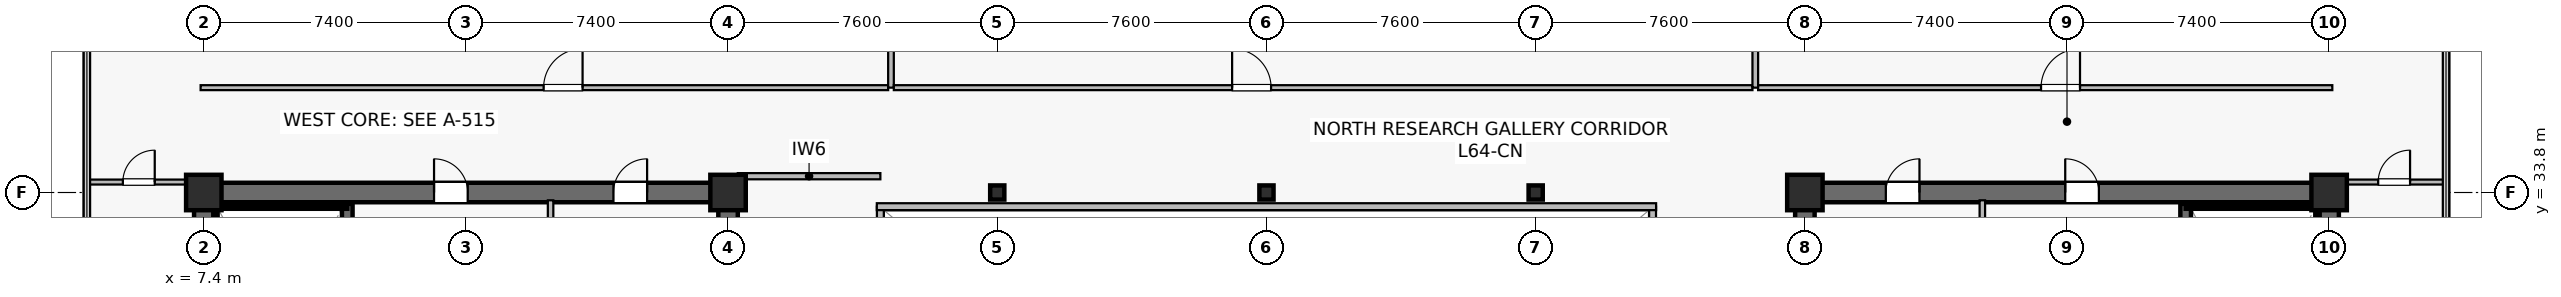
"""IFC4 building model, lengths in metres.
Left out: names, types, materials, properties, quantities, classifications, styles, units other than length and angle.
Written with IfcOpenShell. Run it as: python <this file> out.ifc"""

import sys

from ifc_helpers import new_model, si_unit, direction, frame, frame_2d, origin, origin_2d, place, context, subcontext, project, spatial, rectangle, hollow_rectangle, extrude, source, transform, mapped, element, fill, save


model = new_model("IFC4")
c1 = context("Model", 3, precision=1e-05, world=origin(), true_north=direction((0.0, 1.0)))
c2 = subcontext(c1, "Body", "Model", "MODEL_VIEW")
j1 = project(units=[si_unit("LENGTHUNIT", "METRE"), si_unit("PLANEANGLEUNIT", "RADIAN")], contexts=[c1])
p1 = place(None, origin())
s1 = spatial("IfcSite", under=j1, at=p1, CompositionType="ELEMENT")
p2 = place(p1, origin())
s2 = spatial("IfcBuilding", under=s1, at=p2, CompositionType="ELEMENT")
p3 = place(p2, frame((0.0, 0.0, 267.0)))
s3 = spatial("IfcBuildingStorey", under=s2, at=p3, CompositionType="ELEMENT", Elevation=267.0)
p4 = place(p3, frame((7.125, 33.8, 0.0), z_axis=(0.0, 0.0, 1.0), x_axis=(1.0, 0.0, 0.0)))
e1 = element("IfcWall", 1, at=p4, inside=s3, PredefinedType="SHEAR", context=c2, shape_type="SweptSolid", body=[
    extrude(rectangle(XDim=15.35, YDim=0.55, at=frame_2d((7.675, 0.0))), origin(), (0.0, 0.0, 1.0), 3.8),
])
p5 = place(p4, frame((6.775, 0.0, 0.0)))
e2 = element("IfcOpeningElement", 2, at=p5, cuts=e1, PredefinedType="OPENING", context=c2, shape_type="SweptSolid", body=[
    extrude(rectangle(XDim=0.95, YDim=2.15, at=frame_2d((0.475, 1.075))), frame((0.0, 0.285, 0.0), z_axis=(0.0, -1.0, 0.0), x_axis=(1.0, 0.0, 0.0)), (0.0, 0.0, 1.0), 0.57),
])
p6 = place(p4, frame((11.84, 0.0, 0.0)))
e3 = element("IfcOpeningElement", 3, at=p6, cuts=e1, PredefinedType="OPENING", context=c2, shape_type="SweptSolid", body=[
    extrude(rectangle(XDim=0.95, YDim=2.15, at=frame_2d((0.475, 1.075))), frame((0.0, 0.285, 0.0), z_axis=(0.0, -1.0, 0.0), x_axis=(1.0, 0.0, 0.0)), (0.0, 0.0, 1.0), 0.57),
])
p7 = place(p3, frame((7.4, 15.075, 0.0), z_axis=(0.0, 0.0, 1.0), x_axis=(0.0, 1.0, 0.0)))
e4 = element("IfcWall", 4, at=p7, inside=s3, PredefinedType="SHEAR", context=c2, shape_type="SweptSolid", body=[
    extrude(rectangle(XDim=18.45, YDim=0.55, at=frame_2d((9.225, 0.0))), origin(), (0.0, 0.0, 1.0), 3.8),
])
p8 = place(p3, frame((22.2, 15.075, 0.0), z_axis=(0.0, 0.0, 1.0), x_axis=(0.0, 1.0, 0.0)))
e5 = element("IfcWall", 5, at=p8, inside=s3, PredefinedType="SHEAR", context=c2, shape_type="SweptSolid", body=[
    extrude(rectangle(XDim=18.45, YDim=0.55, at=frame_2d((9.225, 0.0))), origin(), (0.0, 0.0, 1.0), 3.8),
])
p9 = place(p8, frame((3.475, 0.0, 0.0)))
e6 = element("IfcOpeningElement", 6, at=p9, cuts=e5, PredefinedType="OPENING", context=c2, shape_type="SweptSolid", body=[
    extrude(rectangle(XDim=1.42, YDim=2.2, at=frame_2d((0.71, 1.1))), frame((0.0, 0.285, 0.0), z_axis=(0.0, -1.0, 0.0), x_axis=(1.0, 0.0, 0.0)), (0.0, 0.0, 1.0), 0.57),
])
p10 = place(p3, frame((11.45, 24.85, 0.0), z_axis=(0.0, 0.0, 1.0), x_axis=(0.0, 1.0, 0.0)))
e7 = element("IfcWall", 7, at=p10, inside=s3, PredefinedType="SHEAR", context=c2, shape_type="SweptSolid", body=[
    extrude(rectangle(XDim=8.63, YDim=0.3, at=frame_2d((4.315, 0.0))), origin(), (0.0, 0.0, 1.0), 3.8),
])
p11 = place(p10, frame((0.42, 0.0, 0.0)))
e8 = element("IfcOpeningElement", 8, at=p11, cuts=e7, PredefinedType="OPENING", context=c2, shape_type="SweptSolid", body=[
    extrude(rectangle(XDim=1.1, YDim=2.15, at=frame_2d((0.55, 1.075))), frame((0.0, 0.16, 0.0), z_axis=(0.0, -1.0, 0.0), x_axis=(1.0, 0.0, 0.0)), (0.0, 0.0, 1.0), 0.32),
])
p12 = place(p3, frame((7.73, 33.4, 0.0), z_axis=(0.0, 0.0, 1.0), x_axis=(1.0, 0.0, 0.0)))
e9 = element("IfcWall", 9, at=p12, inside=s3, PredefinedType="SOLIDWALL", context=c2, shape_type="SweptSolid", body=[
    extrude(rectangle(XDim=3.72, YDim=0.12, at=frame_2d((1.86, 0.0))), origin(), (0.0, 0.0, 1.0), 3.8),
])
p13 = place(p3, frame((7.73, 25.0, 0.0), z_axis=(0.0, 0.0, 1.0), x_axis=(0.0, 1.0, 0.0)))
e10 = element("IfcWall", 10, at=p13, inside=s3, PredefinedType="SOLIDWALL", context=c2, shape_type="SweptSolid", body=[
    extrude(rectangle(XDim=8.32, YDim=0.12, at=frame_2d((4.16, 0.0))), origin(), (0.0, 0.0, 1.0), 3.8),
])
p14 = place(p3, frame((52.325, 33.8, 0.0), z_axis=(0.0, 0.0, 1.0), x_axis=(1.0, 0.0, 0.0)))
e11 = element("IfcWall", 11, at=p14, inside=s3, PredefinedType="SHEAR", context=c2, shape_type="SweptSolid", body=[
    extrude(rectangle(XDim=15.35, YDim=0.55, at=frame_2d((7.675, 0.0))), origin(), (0.0, 0.0, 1.0), 3.8),
])
p15 = place(p14, frame((7.625, 0.0, 0.0)))
e12 = element("IfcOpeningElement", 12, at=p15, cuts=e11, PredefinedType="OPENING", context=c2, shape_type="SweptSolid", body=[
    extrude(rectangle(XDim=0.95, YDim=2.15, at=frame_2d((0.475, 1.075))), frame((0.0, 0.285, 0.0), z_axis=(0.0, -1.0, 0.0), x_axis=(1.0, 0.0, 0.0)), (0.0, 0.0, 1.0), 0.57),
])
p16 = place(p14, frame((2.56, 0.0, 0.0)))
e13 = element("IfcOpeningElement", 13, at=p16, cuts=e11, PredefinedType="OPENING", context=c2, shape_type="SweptSolid", body=[
    extrude(rectangle(XDim=0.95, YDim=2.15, at=frame_2d((0.475, 1.075))), frame((0.0, 0.285, 0.0), z_axis=(0.0, -1.0, 0.0), x_axis=(1.0, 0.0, 0.0)), (0.0, 0.0, 1.0), 0.57),
])
p17 = place(p3, frame((52.6, 15.075, 0.0), z_axis=(0.0, 0.0, 1.0), x_axis=(0.0, 1.0, 0.0)))
e14 = element("IfcWall", 14, at=p17, inside=s3, PredefinedType="SHEAR", context=c2, shape_type="SweptSolid", body=[
    extrude(rectangle(XDim=18.45, YDim=0.55, at=frame_2d((9.225, 0.0))), origin(), (0.0, 0.0, 1.0), 3.8),
])
p18 = place(p17, frame((3.475, 0.0, 0.0)))
e15 = element("IfcOpeningElement", 15, at=p18, cuts=e14, PredefinedType="OPENING", context=c2, shape_type="SweptSolid", body=[
    extrude(rectangle(XDim=1.42, YDim=2.2, at=frame_2d((0.71, 1.1))), frame((0.0, 0.285, 0.0), z_axis=(0.0, -1.0, 0.0), x_axis=(1.0, 0.0, 0.0)), (0.0, 0.0, 1.0), 0.57),
])
p19 = place(p3, frame((67.4, 15.075, 0.0), z_axis=(0.0, 0.0, 1.0), x_axis=(0.0, 1.0, 0.0)))
e16 = element("IfcWall", 16, at=p19, inside=s3, PredefinedType="SHEAR", context=c2, shape_type="SweptSolid", body=[
    extrude(rectangle(XDim=18.45, YDim=0.55, at=frame_2d((9.225, 0.0))), origin(), (0.0, 0.0, 1.0), 3.8),
])
p20 = place(p3, frame((63.35, 24.85, 0.0), z_axis=(0.0, 0.0, 1.0), x_axis=(0.0, 1.0, 0.0)))
e17 = element("IfcWall", 17, at=p20, inside=s3, PredefinedType="SHEAR", context=c2, shape_type="SweptSolid", body=[
    extrude(rectangle(XDim=8.63, YDim=0.3, at=frame_2d((4.315, 0.0))), origin(), (0.0, 0.0, 1.0), 3.8),
])
p21 = place(p20, frame((0.42, 0.0, 0.0)))
e18 = element("IfcOpeningElement", 18, at=p21, cuts=e17, PredefinedType="OPENING", context=c2, shape_type="SweptSolid", body=[
    extrude(rectangle(XDim=1.1, YDim=2.15, at=frame_2d((0.55, 1.075))), frame((0.0, 0.16, 0.0), z_axis=(0.0, -1.0, 0.0), x_axis=(1.0, 0.0, 0.0)), (0.0, 0.0, 1.0), 0.32),
])
p22 = place(p3, frame((63.35, 33.4, 0.0), z_axis=(0.0, 0.0, 1.0), x_axis=(1.0, 0.0, 0.0)))
e19 = element("IfcWall", 19, at=p22, inside=s3, PredefinedType="SOLIDWALL", context=c2, shape_type="SweptSolid", body=[
    extrude(rectangle(XDim=3.72, YDim=0.12, at=frame_2d((1.86, 0.0))), origin(), (0.0, 0.0, 1.0), 3.8),
])
p23 = place(p3, frame((67.07, 25.0, 0.0), z_axis=(0.0, 0.0, 1.0), x_axis=(0.0, 1.0, 0.0)))
e20 = element("IfcWall", 20, at=p23, inside=s3, PredefinedType="SOLIDWALL", context=c2, shape_type="SweptSolid", body=[
    extrude(rectangle(XDim=8.32, YDim=0.12, at=frame_2d((4.16, 0.0))), origin(), (0.0, 0.0, 1.0), 3.8),
])
m1 = source(origin(), c2, "Body", "SweptSolid", [
    extrude(rectangle(XDim=1.0, YDim=1.0, at=origin_2d()), origin(), (0.0, 0.0, 1.0), 4.1),
])
for number, where, z_axis, x_axis in (
    (21, (7.4, 33.8, 0.0), (0.0, 0.0, 1.0), (1.0, 0.0, 0.0)),
    (22, (22.2, 33.8, 0.0), (0.0, 0.0, 1.0), (1.0, 0.0, 0.0)),
    (23, (52.6, 33.8, 0.0), (0.0, 0.0, 1.0), (1.0, 0.0, 0.0)),
    (24, (67.4, 33.8, 0.0), (0.0, 0.0, 1.0), (1.0, 0.0, 0.0)),
):
    element("IfcColumn", number, at=place(p3, frame(where, z_axis=z_axis, x_axis=x_axis)), inside=s3, PredefinedType="COLUMN", context=c2, shape_type="MappedRepresentation", body=[
        mapped(m1, transform((0.0, 0.0, 0.0), scale=1.0)),
    ])
m2 = source(origin(), c2, "Body", "SweptSolid", [
    extrude(hollow_rectangle(XDim=0.4, YDim=0.4, WallThickness=0.019, at=origin_2d()), origin(), (0.0, 0.0, 1.0), 4.1),
])
for number, where, z_axis, x_axis in (
    (25, (29.8, 33.8, 0.0), (0.0, 0.0, 1.0), (1.0, 0.0, 0.0)),
    (26, (37.4, 33.8, 0.0), (0.0, 0.0, 1.0), (1.0, 0.0, 0.0)),
    (27, (45.0, 33.8, 0.0), (0.0, 0.0, 1.0), (1.0, 0.0, 0.0)),
):
    element("IfcColumn", number, at=place(p3, frame(where, z_axis=z_axis, x_axis=x_axis)), inside=s3, PredefinedType="COLUMN", context=c2, shape_type="MappedRepresentation", body=[
        mapped(m2, transform((0.0, 0.0, 0.0), scale=1.0)),
    ])
for number, where, z_axis, x_axis in (
    (28, (17.19, 29.65, 0.0), (0.0, 0.0, 1.0), (0.0, 1.0, 0.0)),
    (29, (57.61, 29.65, 0.0), (0.0, 0.0, 1.0), (0.0, 1.0, 0.0)),
):
    element("IfcWall", number, at=place(p3, frame(where, z_axis=z_axis, x_axis=x_axis)), inside=s3, PredefinedType="PLUMBINGWALL", context=c2, shape_type="SweptSolid", body=[
        extrude(rectangle(XDim=3.93, YDim=0.155, at=frame_2d((1.965, 0.0))), origin(), (0.0, 0.0, 1.0), 3.8),
    ])
p24 = place(p3, frame((22.475, 34.26, 0.0), z_axis=(0.0, 0.0, 1.0), x_axis=(1.0, 0.0, 0.0)))
e30 = element("IfcWall", 30, at=p24, inside=s3, PredefinedType="PARTITIONING", context=c2, shape_type="SweptSolid", body=[
    extrude(rectangle(XDim=4.025, YDim=0.175, at=frame_2d((2.012, 0.0))), origin(), (0.0, 0.0, 1.0), 3.535),
])
p25 = place(p3, frame((26.5, 15.2, 0.0), z_axis=(0.0, 0.0, 1.0), x_axis=(0.0, 1.0, 0.0)))
e31 = element("IfcWall", 31, at=p25, inside=s3, PredefinedType="SOLIDWALL", context=c2, shape_type="SweptSolid", body=[
    extrude(rectangle(XDim=18.2, YDim=0.195, at=frame_2d((9.1, 0.0))), origin(), (0.0, 0.0, 1.0), 3.8),
])
p26 = place(p25, frame((1.8, 0.0, 0.9)))
e32 = element("IfcOpeningElement", 32, at=p26, cuts=e31, PredefinedType="OPENING", context=c2, shape_type="SweptSolid", body=[
    extrude(rectangle(XDim=1.5, YDim=1.4, at=frame_2d((0.75, 0.7))), frame((0.0, 0.107, 0.0), z_axis=(0.0, -1.0, 0.0), x_axis=(1.0, 0.0, 0.0)), (0.0, 0.0, 1.0), 0.215),
])
p27 = place(p25, frame((13.2, 0.0, 0.9)))
e33 = element("IfcOpeningElement", 33, at=p27, cuts=e31, PredefinedType="OPENING", context=c2, shape_type="SweptSolid", body=[
    extrude(rectangle(XDim=1.5, YDim=1.4, at=frame_2d((0.75, 0.7))), frame((0.0, 0.107, 0.0), z_axis=(0.0, -1.0, 0.0), x_axis=(1.0, 0.0, 0.0)), (0.0, 0.0, 1.0), 0.215),
])
p28 = place(p3, frame((48.3, 15.2, 0.0), z_axis=(0.0, 0.0, 1.0), x_axis=(0.0, 1.0, 0.0)))
e34 = element("IfcWall", 34, at=p28, inside=s3, PredefinedType="SOLIDWALL", context=c2, shape_type="SweptSolid", body=[
    extrude(rectangle(XDim=18.2, YDim=0.195, at=frame_2d((9.1, 0.0))), origin(), (0.0, 0.0, 1.0), 3.8),
])
p29 = place(p28, frame((1.8, 0.0, 0.9)))
e35 = element("IfcOpeningElement", 35, at=p29, cuts=e34, PredefinedType="OPENING", context=c2, shape_type="SweptSolid", body=[
    extrude(rectangle(XDim=1.5, YDim=1.4, at=frame_2d((0.75, 0.7))), frame((0.0, 0.107, 0.0), z_axis=(0.0, -1.0, 0.0), x_axis=(1.0, 0.0, 0.0)), (0.0, 0.0, 1.0), 0.215),
])
p30 = place(p28, frame((13.2, 0.0, 0.9)))
e36 = element("IfcOpeningElement", 36, at=p30, cuts=e34, PredefinedType="OPENING", context=c2, shape_type="SweptSolid", body=[
    extrude(rectangle(XDim=1.5, YDim=1.4, at=frame_2d((0.75, 0.7))), frame((0.0, 0.107, 0.0), z_axis=(0.0, -1.0, 0.0), x_axis=(1.0, 0.0, 0.0)), (0.0, 0.0, 1.0), 0.215),
])
p31 = place(p3, frame((26.4, 33.4, 0.0), z_axis=(0.0, 0.0, 1.0), x_axis=(1.0, 0.0, 0.0)))
e37 = element("IfcWall", 37, at=p31, inside=s3, PredefinedType="SOLIDWALL", context=c2, shape_type="SweptSolid", body=[
    extrude(rectangle(XDim=22.0, YDim=0.195, at=frame_2d((11.0, 0.0))), origin(), (0.0, 0.0, 1.0), 3.8),
])
p32 = place(p3, frame((7.31, 36.76, 0.0), z_axis=(0.0, 0.0, 1.0), x_axis=(1.0, 0.0, 0.0)))
e38 = element("IfcWall", 38, at=p32, inside=s3, PredefinedType="PARTITIONING", context=c2, shape_type="SweptSolid", body=[
    extrude(rectangle(XDim=19.41, YDim=0.14, at=frame_2d((9.705, 0.0))), origin(), (0.0, 0.0, 1.0), 3.197),
])
p33 = place(p32, frame((9.683, 0.0, 0.0)))
e39 = element("IfcOpeningElement", 39, at=p33, cuts=e38, PredefinedType="OPENING", context=c2, shape_type="SweptSolid", body=[
    extrude(rectangle(XDim=1.1, YDim=2.18, at=frame_2d((0.55, 1.09))), frame((0.0, 0.08, 0.0), z_axis=(0.0, -1.0, 0.0), x_axis=(1.0, 0.0, 0.0)), (0.0, 0.0, 1.0), 0.16),
])
p34 = place(p3, frame((26.8, 36.76, 0.0), z_axis=(0.0, 0.0, 1.0), x_axis=(0.0, 1.0, 0.0)))
e40 = element("IfcWall", 40, at=p34, inside=s3, PredefinedType="PARTITIONING", context=c2, shape_type="SweptSolid", body=[
    extrude(rectangle(XDim=7.93, YDim=0.16, at=frame_2d((3.965, 0.0))), origin(), (0.0, 0.0, 1.0), 3.135),
])
p35 = place(p3, frame((26.88, 36.76, 0.0), z_axis=(0.0, 0.0, 1.0), x_axis=(1.0, 0.0, 0.0)))
e41 = element("IfcWall", 41, at=p35, inside=s3, PredefinedType="PARTITIONING", context=c2, shape_type="SweptSolid", body=[
    extrude(rectangle(XDim=24.24, YDim=0.14, at=frame_2d((12.12, 0.0))), origin(), (0.0, 0.0, 1.0), 3.197),
])
p36 = place(p35, frame((9.55, 0.0, 0.0)))
e42 = element("IfcOpeningElement", 42, at=p36, cuts=e41, PredefinedType="OPENING", context=c2, shape_type="SweptSolid", body=[
    extrude(rectangle(XDim=1.1, YDim=2.18, at=frame_2d((0.55, 1.09))), frame((0.0, 0.08, 0.0), z_axis=(0.0, -1.0, 0.0), x_axis=(1.0, 0.0, 0.0)), (0.0, 0.0, 1.0), 0.16),
])
p37 = place(p3, frame((51.2, 36.76, 0.0), z_axis=(0.0, 0.0, 1.0), x_axis=(0.0, 1.0, 0.0)))
e43 = element("IfcWall", 43, at=p37, inside=s3, PredefinedType="PARTITIONING", context=c2, shape_type="SweptSolid", body=[
    extrude(rectangle(XDim=9.13, YDim=0.16, at=frame_2d((4.565, 0.0))), origin(), (0.0, 0.0, 1.0), 3.135),
])
p38 = place(p3, frame((51.28, 36.76, 0.0), z_axis=(0.0, 0.0, 1.0), x_axis=(1.0, 0.0, 0.0)))
e44 = element("IfcWall", 44, at=p38, inside=s3, PredefinedType="PARTITIONING", context=c2, shape_type="SweptSolid", body=[
    extrude(rectangle(XDim=16.21, YDim=0.14, at=frame_2d((8.105, 0.0))), origin(), (0.0, 0.0, 1.0), 3.197),
])
p39 = place(p38, frame((7.987, 0.0, 0.0)))
e45 = element("IfcOpeningElement", 45, at=p39, cuts=e44, PredefinedType="OPENING", context=c2, shape_type="SweptSolid", body=[
    extrude(rectangle(XDim=1.1, YDim=2.18, at=frame_2d((0.55, 1.09))), frame((0.0, 0.08, 0.0), z_axis=(0.0, -1.0, 0.0), x_axis=(1.0, 0.0, 0.0)), (0.0, 0.0, 1.0), 0.16),
])
p40 = place(p3, frame((4.11, 34.095, 0.0), z_axis=(0.0, 0.0, 1.0), x_axis=(1.0, 0.0, 0.0)))
e46 = element("IfcWall", 46, at=p40, inside=s3, PredefinedType="PARTITIONING", context=c2, shape_type="SweptSolid", body=[
    extrude(rectangle(XDim=2.91, YDim=0.14, at=frame_2d((1.455, 0.0))), origin(), (0.0, 0.0, 1.0), 3.8),
])
p41 = place(p40, frame((1.005, 0.0, 0.0)))
e47 = element("IfcOpeningElement", 47, at=p41, cuts=e46, PredefinedType="OPENING", context=c2, shape_type="SweptSolid", body=[
    extrude(rectangle(XDim=0.9, YDim=2.1, at=frame_2d((0.45, 1.05))), frame((0.0, 0.08, 0.0), z_axis=(0.0, -1.0, 0.0), x_axis=(1.0, 0.0, 0.0)), (0.0, 0.0, 1.0), 0.16),
])
p42 = place(p3, frame((67.78, 34.095, 0.0), z_axis=(0.0, 0.0, 1.0), x_axis=(1.0, 0.0, 0.0)))
e48 = element("IfcWall", 48, at=p42, inside=s3, PredefinedType="PARTITIONING", context=c2, shape_type="SweptSolid", body=[
    extrude(rectangle(XDim=2.91, YDim=0.14, at=frame_2d((1.455, 0.0))), origin(), (0.0, 0.0, 1.0), 3.8),
])
p43 = place(p42, frame((1.005, 0.0, 0.0)))
e49 = element("IfcOpeningElement", 49, at=p43, cuts=e48, PredefinedType="OPENING", context=c2, shape_type="SweptSolid", body=[
    extrude(rectangle(XDim=0.9, YDim=2.1, at=frame_2d((0.45, 1.05))), frame((0.0, 0.08, 0.0), z_axis=(0.0, -1.0, 0.0), x_axis=(1.0, 0.0, 0.0)), (0.0, 0.0, 1.0), 0.16),
])
m3 = source(origin(), c2, "Body", "SweptSolid", [
    extrude(rectangle(XDim=0.95, YDim=2.15, at=frame_2d((0.475, 1.075))), frame((0.0, 0.025, 0.0), z_axis=(0.0, -1.0, 0.0), x_axis=(1.0, 0.0, 0.0)), (0.0, 0.0, 1.0), 0.05),
])
p44 = place(p5, origin())
e50 = element("IfcDoor", 50, at=p44, inside=s3, OperationType="SINGLE_SWING_LEFT", PredefinedType="DOOR", context=c2, shape_type="MappedRepresentation", body=[
    mapped(m3, transform((0.0, 0.0, 0.0), scale=1.0)),
])
fill(e2, e50)
p45 = place(p6, origin())
e51 = element("IfcDoor", 51, at=p45, inside=s3, OperationType="SINGLE_SWING_RIGHT", PredefinedType="DOOR", context=c2, shape_type="MappedRepresentation", body=[
    mapped(m3, transform((0.0, 0.0, 0.0), scale=1.0)),
])
fill(e3, e51)
p46 = place(p15, origin())
e52 = element("IfcDoor", 52, at=p46, inside=s3, OperationType="SINGLE_SWING_LEFT", PredefinedType="DOOR", context=c2, shape_type="MappedRepresentation", body=[
    mapped(m3, transform((0.0, 0.0, 0.0), scale=1.0)),
])
fill(e12, e52)
p47 = place(p16, origin())
e53 = element("IfcDoor", 53, at=p47, inside=s3, OperationType="SINGLE_SWING_RIGHT", PredefinedType="DOOR", context=c2, shape_type="MappedRepresentation", body=[
    mapped(m3, transform((0.0, 0.0, 0.0), scale=1.0)),
])
fill(e13, e53)
m4 = source(origin(), c2, "Body", "SweptSolid", [
    extrude(rectangle(XDim=1.1, YDim=2.18, at=frame_2d((0.55, 1.09))), frame((0.0, 0.025, 0.0), z_axis=(0.0, -1.0, 0.0), x_axis=(1.0, 0.0, 0.0)), (0.0, 0.0, 1.0), 0.05),
])
p48 = place(p33, origin())
e54 = element("IfcDoor", 54, at=p48, inside=s3, OperationType="SINGLE_SWING_RIGHT", PredefinedType="DOOR", context=c2, shape_type="MappedRepresentation", body=[
    mapped(m4, transform((0.0, 0.0, 0.0), scale=1.0)),
])
fill(e39, e54)
p49 = place(p36, origin())
e55 = element("IfcDoor", 55, at=p49, inside=s3, OperationType="SINGLE_SWING_LEFT", PredefinedType="DOOR", context=c2, shape_type="MappedRepresentation", body=[
    mapped(m4, transform((0.0, 0.0, 0.0), scale=1.0)),
])
fill(e42, e55)
p50 = place(p39, origin())
e56 = element("IfcDoor", 56, at=p50, inside=s3, OperationType="SINGLE_SWING_RIGHT", PredefinedType="DOOR", context=c2, shape_type="MappedRepresentation", body=[
    mapped(m4, transform((0.0, 0.0, 0.0), scale=1.0)),
])
fill(e45, e56)
m5 = source(origin(), c2, "Body", "SweptSolid", [
    extrude(rectangle(XDim=0.9, YDim=2.1, at=frame_2d((0.45, 1.05))), frame((0.0, 0.025, 0.0), z_axis=(0.0, -1.0, 0.0), x_axis=(1.0, 0.0, 0.0)), (0.0, 0.0, 1.0), 0.05),
])
p51 = place(p41, origin())
e57 = element("IfcDoor", 57, at=p51, inside=s3, OperationType="SINGLE_SWING_RIGHT", PredefinedType="DOOR", context=c2, shape_type="MappedRepresentation", body=[
    mapped(m5, transform((0.0, 0.0, 0.0), scale=1.0)),
])
fill(e47, e57)
p52 = place(p43, origin())
e58 = element("IfcDoor", 58, at=p52, inside=s3, OperationType="SINGLE_SWING_RIGHT", PredefinedType="DOOR", context=c2, shape_type="MappedRepresentation", body=[
    mapped(m5, transform((0.0, 0.0, 0.0), scale=1.0)),
])
fill(e49, e58)
save(model, sys.argv[1])
